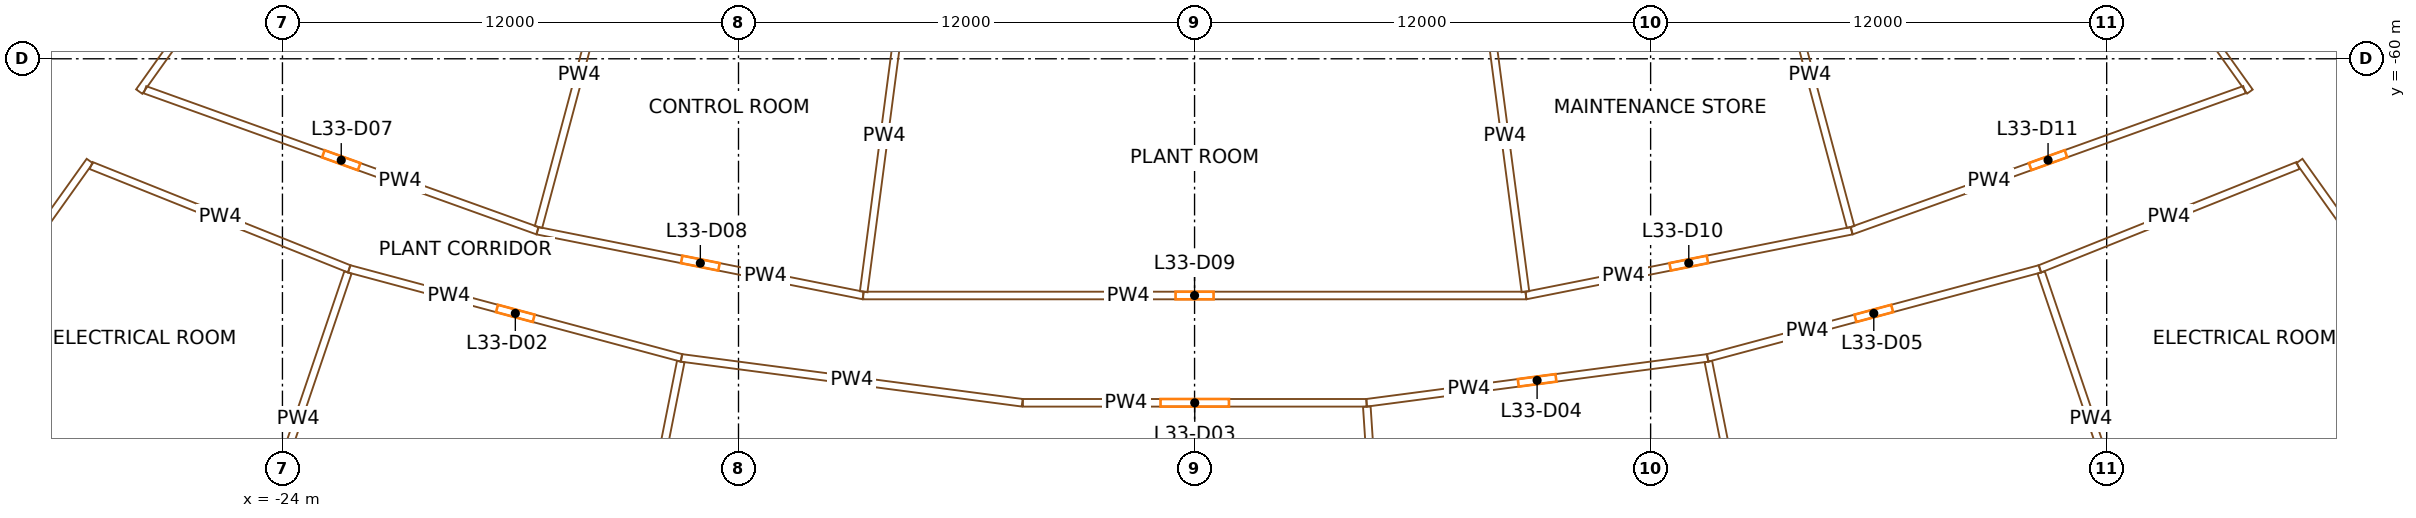
"""IFC4 building model, lengths in metres.
Left out: names, types, materials, properties, quantities, classifications, styles, units other than length and angle.
Written with IfcOpenShell. Run it as: python <this file> out.ifc"""

import sys

from ifc_helpers import new_model, si_unit, direction, frame, frame_2d, origin, place, context, subcontext, project, spatial, rectangle, extrude, element, fill, save


model = new_model("IFC4")
c1 = context("Model", 3, precision=1e-05, world=origin(), true_north=direction((0.0, 1.0)))
c2 = subcontext(c1, "Body", "Model", "MODEL_VIEW")
j1 = project(units=[si_unit("LENGTHUNIT", "METRE"), si_unit("PLANEANGLEUNIT", "RADIAN")], contexts=[c1])
p1 = place(None, origin())
s1 = spatial("IfcSite", under=j1, at=p1, CompositionType="ELEMENT")
p2 = place(p1, origin())
s2 = spatial("IfcBuilding", under=s1, at=p2, CompositionType="ELEMENT")
p3 = place(p2, frame((0.0, 0.0, 144.3)))
s3 = spatial("IfcBuildingStorey", under=s2, at=p3, CompositionType="ELEMENT", Elevation=144.3)
p4 = place(p3, frame((-36.717, -66.337, 0.0), z_axis=(0.0, 0.0, 1.0), x_axis=(0.573577477574, 0.819151315216, 0.0)))
e1 = element("IfcWall", 1, at=p4, inside=s3, PredefinedType="SHEAR", context=c2, shape_type="SweptSolid", body=[
    extrude(rectangle(XDim=14.8, YDim=0.9, at=frame_2d((7.4, 0.0))), origin(), (0.0, 0.0, 1.0), 4.7),
])
p5 = place(p4, frame((6.2, 0.0, 0.0)))
e2 = element("IfcOpeningElement", 2, at=p5, cuts=e1, PredefinedType="OPENING", context=c2, shape_type="SweptSolid", body=[
    extrude(rectangle(XDim=2.4, YDim=2.1, at=frame_2d((1.2, 1.05))), frame((0.0, 0.46, 0.0), z_axis=(0.0, -1.0, 0.0), x_axis=(1.0, 0.0, 0.0)), (0.0, 0.0, 1.0), 0.92),
])
p6 = place(p3, frame((36.717, -66.337, 0.0), z_axis=(0.0, 0.0, 1.0), x_axis=(-0.573577477574, 0.819151315216, 0.0)))
e3 = element("IfcWall", 3, at=p6, inside=s3, PredefinedType="SHEAR", context=c2, shape_type="SweptSolid", body=[
    extrude(rectangle(XDim=14.8, YDim=0.9, at=frame_2d((7.4, 0.0))), origin(), (0.0, 0.0, 1.0), 4.7),
])
p7 = place(p6, frame((6.2, 0.0, 0.0)))
e4 = element("IfcOpeningElement", 4, at=p7, cuts=e3, PredefinedType="OPENING", context=c2, shape_type="SweptSolid", body=[
    extrude(rectangle(XDim=2.4, YDim=2.1, at=frame_2d((1.2, 1.05))), frame((0.0, 0.46, 0.0), z_axis=(0.0, -1.0, 0.0), x_axis=(1.0, 0.0, 0.0)), (0.0, 0.0, 1.0), 0.92),
])
p8 = place(p3, frame((-34.153, -69.829, 0.0), z_axis=(0.0, 0.0, 1.0), x_axis=(0.923879094783, -0.382684489133, 0.0)))
e5 = element("IfcWall", 5, at=p8, inside=s3, PredefinedType="PARTITIONING", context=c2, shape_type="SweptSolid", body=[
    extrude(rectangle(XDim=9.916, YDim=0.6, at=frame_2d((4.958, 0.0))), origin(), (0.0, 0.0, 1.0), 3.6),
])
p9 = place(p3, frame((-29.07, -62.69, 0.0), z_axis=(0.0, 0.0, 1.0), x_axis=(-0.580017920191, -0.814603714856, 0.0)))
e6 = element("IfcWall", 6, at=p9, inside=s3, PredefinedType="PARTITIONING", context=c2, shape_type="SweptSolid", body=[
    extrude(rectangle(XDim=8.464, YDim=0.2, at=frame_2d((4.232, 0.0))), origin(), (0.0, 0.0, 1.0), 3.6),
])
p10 = place(p9, frame((3.732, 0.0, 0.0)))
e7 = element("IfcOpeningElement", 7, at=p10, cuts=e6, PredefinedType="OPENING", context=c2, shape_type="SweptSolid", body=[
    extrude(rectangle(XDim=1.0, YDim=2.1, at=frame_2d((0.5, 1.05))), frame((0.0, 0.11, 0.0), z_axis=(0.0, -1.0, 0.0), x_axis=(1.0, 0.0, 0.0)), (0.0, 0.0, 1.0), 0.22),
])
p11 = place(p3, frame((-29.035, -62.808, 0.0), z_axis=(0.0, 0.0, 1.0), x_axis=(0.928343133184, -0.371724396657, 0.0)))
e8 = element("IfcWall", 8, at=p11, inside=s3, PredefinedType="PARTITIONING", context=c2, shape_type="SweptSolid", body=[
    extrude(rectangle(XDim=7.315, YDim=0.2, at=frame_2d((3.658, 0.0))), origin(), (0.0, 0.0, 1.0), 3.6),
])
p12 = place(p3, frame((-27.616, -60.815, 0.0), z_axis=(0.0, 0.0, 1.0), x_axis=(0.941144953961, -0.338003218377, 0.0)))
e9 = element("IfcWall", 9, at=p12, inside=s3, PredefinedType="PARTITIONING", context=c2, shape_type="SweptSolid", body=[
    extrude(rectangle(XDim=10.973, YDim=0.2, at=frame_2d((5.487, 0.0))), origin(), (0.0, 0.0, 1.0), 3.6),
])
p13 = place(p12, frame((4.987, 0.0, 0.0)))
e10 = element("IfcOpeningElement", 10, at=p13, cuts=e9, PredefinedType="OPENING", context=c2, shape_type="SweptSolid", body=[
    extrude(rectangle(XDim=1.0, YDim=2.1, at=frame_2d((0.5, 1.05))), frame((0.0, 0.11, 0.0), z_axis=(0.0, -1.0, 0.0), x_axis=(1.0, 0.0, 0.0)), (0.0, 0.0, 1.0), 0.22),
])
p14 = place(p3, frame((-24.896, -73.34, 0.0), z_axis=(0.0, 0.0, 1.0), x_axis=(0.321453202328, 0.946925466292, 0.0)))
e11 = element("IfcWall", 11, at=p14, inside=s3, PredefinedType="PARTITIONING", context=c2, shape_type="SweptSolid", body=[
    extrude(rectangle(XDim=8.15, YDim=0.2, at=frame_2d((4.075, 0.0))), origin(), (0.0, 0.0, 1.0), 3.6),
])
p15 = place(p3, frame((-22.746, -53.809, 0.0), z_axis=(0.0, 0.0, 1.0), x_axis=(-0.580002652606, -0.814614585537, 0.0)))
e12 = element("IfcWall", 12, at=p15, inside=s3, PredefinedType="PARTITIONING", context=c2, shape_type="SweptSolid", body=[
    extrude(rectangle(XDim=8.659, YDim=0.2, at=frame_2d((4.33, 0.0))), origin(), (0.0, 0.0, 1.0), 3.6),
])
p16 = place(p3, frame((-13.5, -67.87, 0.0), z_axis=(0.0, 0.0, 1.0), x_axis=(-0.965926260719, 0.258817423781, 0.0)))
e13 = element("IfcWall", 13, at=p16, inside=s3, PredefinedType="PARTITIONING", context=c2, shape_type="SweptSolid", body=[
    extrude(rectangle(XDim=9.052, YDim=0.2, at=frame_2d((4.526, 0.0))), origin(), (0.0, 0.0, 1.0), 3.6),
])
p17 = place(p16, frame((4.026, 0.0, 0.0)))
e14 = element("IfcOpeningElement", 14, at=p17, cuts=e13, PredefinedType="OPENING", context=c2, shape_type="SweptSolid", body=[
    extrude(rectangle(XDim=1.0, YDim=2.1, at=frame_2d((0.5, 1.05))), frame((0.0, 0.11, 0.0), z_axis=(0.0, -1.0, 0.0), x_axis=(1.0, 0.0, 0.0)), (0.0, 0.0, 1.0), 0.22),
])
p18 = place(p3, frame((-17.289, -64.524, 0.0), z_axis=(0.0, 0.0, 1.0), x_axis=(0.980786466832, -0.195084357342, 0.0)))
e15 = element("IfcWall", 15, at=p18, inside=s3, PredefinedType="PARTITIONING", context=c2, shape_type="SweptSolid", body=[
    extrude(rectangle(XDim=8.738, YDim=0.2, at=frame_2d((4.369, 0.0))), origin(), (0.0, 0.0, 1.0), 3.6),
])
p19 = place(p18, frame((3.869, 0.0, 0.0)))
e16 = element("IfcOpeningElement", 16, at=p19, cuts=e15, PredefinedType="OPENING", context=c2, shape_type="SweptSolid", body=[
    extrude(rectangle(XDim=1.0, YDim=2.1, at=frame_2d((0.5, 1.05))), frame((0.0, 0.11, 0.0), z_axis=(0.0, -1.0, 0.0), x_axis=(1.0, 0.0, 0.0)), (0.0, 0.0, 1.0), 0.22),
])
p20 = place(p3, frame((-15.11, -75.962, 0.0), z_axis=(0.0, 0.0, 1.0), x_axis=(0.195102141606, 0.980782929267, 0.0)))
e17 = element("IfcWall", 17, at=p20, inside=s3, PredefinedType="PARTITIONING", context=c2, shape_type="SweptSolid", body=[
    extrude(rectangle(XDim=8.15, YDim=0.2, at=frame_2d((4.075, 0.0))), origin(), (0.0, 0.0, 1.0), 3.6),
])
p21 = place(p3, frame((-15.122, -56.435, 0.0), z_axis=(0.0, 0.0, 1.0), x_axis=(-0.258815723485, -0.965926716308, 0.0)))
e18 = element("IfcWall", 18, at=p21, inside=s3, PredefinedType="PARTITIONING", context=c2, shape_type="SweptSolid", body=[
    extrude(rectangle(XDim=8.275, YDim=0.2, at=frame_2d((4.137, 0.0))), origin(), (0.0, 0.0, 1.0), 3.6),
])
p22 = place(p3, frame((-13.5, -67.87, 0.0), z_axis=(0.0, 0.0, 1.0), x_axis=(0.991445838679, -0.130518768632, 0.0)))
e19 = element("IfcWall", 19, at=p22, inside=s3, PredefinedType="PARTITIONING", context=c2, shape_type="SweptSolid", body=[
    extrude(rectangle(XDim=9.042, YDim=0.2, at=frame_2d((4.521, 0.0))), origin(), (0.0, 0.0, 1.0), 3.6),
])
p23 = place(p3, frame((-8.719, -66.229, 0.0), z_axis=(0.0, 0.0, 1.0), x_axis=(1.0, 0.0, 0.0)))
e20 = element("IfcWall", 20, at=p23, inside=s3, PredefinedType="PARTITIONING", context=c2, shape_type="SweptSolid", body=[
    extrude(rectangle(XDim=17.438, YDim=0.2, at=frame_2d((8.719, 0.0))), origin(), (0.0, 0.0, 1.0), 3.6),
])
p24 = place(p23, frame((8.219, 0.0, 0.0)))
e21 = element("IfcOpeningElement", 21, at=p24, cuts=e20, PredefinedType="OPENING", context=c2, shape_type="SweptSolid", body=[
    extrude(rectangle(XDim=1.0, YDim=2.1, at=frame_2d((0.5, 1.05))), frame((0.0, 0.11, 0.0), z_axis=(0.0, -1.0, 0.0), x_axis=(1.0, 0.0, 0.0)), (0.0, 0.0, 1.0), 0.22),
])
p25 = place(p3, frame((-7.626, -57.926, 0.0), z_axis=(0.0, 0.0, 1.0), x_axis=(-0.130528544963, -0.991444551626, 0.0)))
e22 = element("IfcWall", 22, at=p25, inside=s3, PredefinedType="PARTITIONING", context=c2, shape_type="SweptSolid", body=[
    extrude(rectangle(XDim=8.275, YDim=0.2, at=frame_2d((4.137, 0.0))), origin(), (0.0, 0.0, 1.0), 3.6),
])
p26 = place(p3, frame((4.526, -69.052, 0.0), z_axis=(0.0, 0.0, 1.0), x_axis=(-1.0, 0.0, 0.0)))
e23 = element("IfcWall", 23, at=p26, inside=s3, PredefinedType="PARTITIONING", context=c2, shape_type="SweptSolid", body=[
    extrude(rectangle(XDim=9.042, YDim=0.2, at=frame_2d((4.521, 0.0))), origin(), (0.0, 0.0, 1.0), 3.6),
])
p27 = place(p26, frame((3.621, 0.0, 0.0)))
e24 = element("IfcOpeningElement", 24, at=p27, cuts=e23, PredefinedType="OPENING", context=c2, shape_type="SweptSolid", body=[
    extrude(rectangle(XDim=1.8, YDim=2.4, at=frame_2d((0.9, 1.2))), frame((0.0, 0.11, 0.0), z_axis=(0.0, -1.0, 0.0), x_axis=(1.0, 0.0, 0.0)), (0.0, 0.0, 1.0), 0.22),
])
p28 = place(p3, frame((13.5, -67.87, 0.0), z_axis=(0.0, 0.0, 1.0), x_axis=(-0.991446306881, -0.13051521203, 0.0)))
e25 = element("IfcWall", 25, at=p28, inside=s3, PredefinedType="PARTITIONING", context=c2, shape_type="SweptSolid", body=[
    extrude(rectangle(XDim=9.052, YDim=0.2, at=frame_2d((4.526, 0.0))), origin(), (0.0, 0.0, 1.0), 3.6),
])
p29 = place(p28, frame((4.026, 0.0, 0.0)))
e26 = element("IfcOpeningElement", 26, at=p29, cuts=e25, PredefinedType="OPENING", context=c2, shape_type="SweptSolid", body=[
    extrude(rectangle(XDim=1.0, YDim=2.1, at=frame_2d((0.5, 1.05))), frame((0.0, 0.11, 0.0), z_axis=(0.0, -1.0, 0.0), x_axis=(1.0, 0.0, 0.0)), (0.0, 0.0, 1.0), 0.22),
])
p30 = place(p3, frame((5.065, -77.284, 0.0), z_axis=(0.0, 0.0, 1.0), x_axis=(-0.065393635367, 0.997859545454, 0.0)))
e27 = element("IfcWall", 27, at=p30, inside=s3, PredefinedType="PARTITIONING", context=c2, shape_type="SweptSolid", body=[
    extrude(rectangle(XDim=8.15, YDim=0.2, at=frame_2d((4.075, 0.0))), origin(), (0.0, 0.0, 1.0), 3.6),
])
p31 = place(p3, frame((7.626, -57.926, 0.0), z_axis=(0.0, 0.0, 1.0), x_axis=(0.130528544963, -0.991444551626, 0.0)))
e28 = element("IfcWall", 28, at=p31, inside=s3, PredefinedType="PARTITIONING", context=c2, shape_type="SweptSolid", body=[
    extrude(rectangle(XDim=8.275, YDim=0.2, at=frame_2d((4.137, 0.0))), origin(), (0.0, 0.0, 1.0), 3.6),
])
p32 = place(p3, frame((8.719, -66.229, 0.0), z_axis=(0.0, 0.0, 1.0), x_axis=(0.980786466832, 0.195084357342, 0.0)))
e29 = element("IfcWall", 29, at=p32, inside=s3, PredefinedType="PARTITIONING", context=c2, shape_type="SweptSolid", body=[
    extrude(rectangle(XDim=8.738, YDim=0.2, at=frame_2d((4.369, 0.0))), origin(), (0.0, 0.0, 1.0), 3.6),
])
p33 = place(p32, frame((3.869, 0.0, 0.0)))
e30 = element("IfcOpeningElement", 30, at=p33, cuts=e29, PredefinedType="OPENING", context=c2, shape_type="SweptSolid", body=[
    extrude(rectangle(XDim=1.0, YDim=2.1, at=frame_2d((0.5, 1.05))), frame((0.0, 0.11, 0.0), z_axis=(0.0, -1.0, 0.0), x_axis=(1.0, 0.0, 0.0)), (0.0, 0.0, 1.0), 0.22),
])
p34 = place(p3, frame((22.244, -65.528, 0.0), z_axis=(0.0, 0.0, 1.0), x_axis=(-0.965926260719, -0.258817423781, 0.0)))
e31 = element("IfcWall", 31, at=p34, inside=s3, PredefinedType="PARTITIONING", context=c2, shape_type="SweptSolid", body=[
    extrude(rectangle(XDim=9.052, YDim=0.2, at=frame_2d((4.526, 0.0))), origin(), (0.0, 0.0, 1.0), 3.6),
])
p35 = place(p34, frame((4.026, 0.0, 0.0)))
e32 = element("IfcOpeningElement", 32, at=p35, cuts=e31, PredefinedType="OPENING", context=c2, shape_type="SweptSolid", body=[
    extrude(rectangle(XDim=1.0, YDim=2.1, at=frame_2d((0.5, 1.05))), frame((0.0, 0.11, 0.0), z_axis=(0.0, -1.0, 0.0), x_axis=(1.0, 0.0, 0.0)), (0.0, 0.0, 1.0), 0.22),
])
p36 = place(p3, frame((15.122, -56.435, 0.0), z_axis=(0.0, 0.0, 1.0), x_axis=(0.258815723485, -0.965926716308, 0.0)))
e33 = element("IfcWall", 33, at=p36, inside=s3, PredefinedType="PARTITIONING", context=c2, shape_type="SweptSolid", body=[
    extrude(rectangle(XDim=8.275, YDim=0.2, at=frame_2d((4.137, 0.0))), origin(), (0.0, 0.0, 1.0), 3.6),
])
p37 = place(p3, frame((15.11, -75.962, 0.0), z_axis=(0.0, 0.0, 1.0), x_axis=(-0.195102141606, 0.980782929267, 0.0)))
e34 = element("IfcWall", 34, at=p37, inside=s3, PredefinedType="PARTITIONING", context=c2, shape_type="SweptSolid", body=[
    extrude(rectangle(XDim=8.15, YDim=0.2, at=frame_2d((4.075, 0.0))), origin(), (0.0, 0.0, 1.0), 3.6),
])
p38 = place(p3, frame((17.289, -64.524, 0.0), z_axis=(0.0, 0.0, 1.0), x_axis=(0.941152070644, 0.337983401845, 0.0)))
e35 = element("IfcWall", 35, at=p38, inside=s3, PredefinedType="PARTITIONING", context=c2, shape_type="SweptSolid", body=[
    extrude(rectangle(XDim=10.983, YDim=0.2, at=frame_2d((5.492, 0.0))), origin(), (0.0, 0.0, 1.0), 3.6),
])
p39 = place(p38, frame((4.992, 0.0, 0.0)))
e36 = element("IfcOpeningElement", 36, at=p39, cuts=e35, PredefinedType="OPENING", context=c2, shape_type="SweptSolid", body=[
    extrude(rectangle(XDim=1.0, YDim=2.1, at=frame_2d((0.5, 1.05))), frame((0.0, 0.11, 0.0), z_axis=(0.0, -1.0, 0.0), x_axis=(1.0, 0.0, 0.0)), (0.0, 0.0, 1.0), 0.22),
])
p40 = place(p3, frame((22.244, -65.528, 0.0), z_axis=(0.0, 0.0, 1.0), x_axis=(0.928343133184, 0.371724396657, 0.0)))
e37 = element("IfcWall", 37, at=p40, inside=s3, PredefinedType="PARTITIONING", context=c2, shape_type="SweptSolid", body=[
    extrude(rectangle(XDim=7.315, YDim=0.2, at=frame_2d((3.658, 0.0))), origin(), (0.0, 0.0, 1.0), 3.6),
])
p41 = place(p3, frame((22.746, -53.809, 0.0), z_axis=(0.0, 0.0, 1.0), x_axis=(0.580002652606, -0.814614585537, 0.0)))
e38 = element("IfcWall", 38, at=p41, inside=s3, PredefinedType="PARTITIONING", context=c2, shape_type="SweptSolid", body=[
    extrude(rectangle(XDim=8.659, YDim=0.18, at=frame_2d((4.33, 0.0))), origin(), (0.0, 0.0, 1.0), 3.6),
])
p42 = place(p3, frame((24.896, -73.34, 0.0), z_axis=(0.0, 0.0, 1.0), x_axis=(-0.321453202328, 0.946925466292, 0.0)))
e39 = element("IfcWall", 39, at=p42, inside=s3, PredefinedType="PARTITIONING", context=c2, shape_type="SweptSolid", body=[
    extrude(rectangle(XDim=8.15, YDim=0.2, at=frame_2d((4.075, 0.0))), origin(), (0.0, 0.0, 1.0), 3.6),
])
p43 = place(p3, frame((24.992, -73.624, 0.0), z_axis=(0.0, 0.0, 1.0), x_axis=(0.923879094783, 0.382684489133, 0.0)))
e40 = element("IfcWall", 40, at=p43, inside=s3, PredefinedType="PARTITIONING", context=c2, shape_type="SweptSolid", body=[
    extrude(rectangle(XDim=9.916, YDim=0.6, at=frame_2d((4.958, 0.0))), origin(), (0.0, 0.0, 1.0), 3.6),
])
p44 = place(p3, frame((33.979, -69.585, 0.0), z_axis=(0.0, 0.0, 1.0), x_axis=(-0.580017920191, 0.814603714856, 0.0)))
e41 = element("IfcWall", 41, at=p44, inside=s3, PredefinedType="PARTITIONING", context=c2, shape_type="SweptSolid", body=[
    extrude(rectangle(XDim=8.464, YDim=0.2, at=frame_2d((4.232, 0.0))), origin(), (0.0, 0.0, 1.0), 3.6),
])
p45 = place(p44, frame((3.732, 0.0, 0.0)))
e42 = element("IfcOpeningElement", 42, at=p45, cuts=e41, PredefinedType="OPENING", context=c2, shape_type="SweptSolid", body=[
    extrude(rectangle(XDim=1.0, YDim=2.1, at=frame_2d((0.5, 1.05))), frame((0.0, 0.11, 0.0), z_axis=(0.0, -1.0, 0.0), x_axis=(1.0, 0.0, 0.0)), (0.0, 0.0, 1.0), 0.22),
])
p46 = place(p17, origin())
e43 = element("IfcDoor", 43, at=p46, inside=s3, OperationType="SINGLE_SWING_RIGHT", PredefinedType="DOOR", context=c2, shape_type="SweptSolid", body=[
    extrude(rectangle(XDim=1.0, YDim=2.1, at=frame_2d((0.5, 1.05))), frame((0.0, 0.025, 0.0), z_axis=(0.0, -1.0, 0.0), x_axis=(1.0, 0.0, 0.0)), (0.0, 0.0, 1.0), 0.05),
])
fill(e14, e43)
p47 = place(p27, origin())
e44 = element("IfcDoor", 44, at=p47, inside=s3, OperationType="DOUBLE_DOOR_SINGLE_SWING", PredefinedType="DOOR", context=c2, shape_type="SweptSolid", body=[
    extrude(rectangle(XDim=1.8, YDim=2.4, at=frame_2d((0.9, 1.2))), frame((0.0, 0.025, 0.0), z_axis=(0.0, -1.0, 0.0), x_axis=(1.0, 0.0, 0.0)), (0.0, 0.0, 1.0), 0.05),
])
fill(e24, e44)
p48 = place(p29, origin())
e45 = element("IfcDoor", 45, at=p48, inside=s3, OperationType="SINGLE_SWING_RIGHT", PredefinedType="DOOR", context=c2, shape_type="SweptSolid", body=[
    extrude(rectangle(XDim=1.0, YDim=2.1, at=frame_2d((0.5, 1.05))), frame((0.0, 0.025, 0.0), z_axis=(0.0, -1.0, 0.0), x_axis=(1.0, 0.0, 0.0)), (0.0, 0.0, 1.0), 0.05),
])
fill(e26, e45)
p49 = place(p35, origin())
e46 = element("IfcDoor", 46, at=p49, inside=s3, OperationType="SINGLE_SWING_RIGHT", PredefinedType="DOOR", context=c2, shape_type="SweptSolid", body=[
    extrude(rectangle(XDim=1.0, YDim=2.1, at=frame_2d((0.5, 1.05))), frame((0.0, 0.025, 0.0), z_axis=(0.0, -1.0, 0.0), x_axis=(1.0, 0.0, 0.0)), (0.0, 0.0, 1.0), 0.05),
])
fill(e32, e46)
p50 = place(p13, origin())
e47 = element("IfcDoor", 47, at=p50, inside=s3, OperationType="SINGLE_SWING_RIGHT", PredefinedType="DOOR", context=c2, shape_type="SweptSolid", body=[
    extrude(rectangle(XDim=1.0, YDim=2.1, at=frame_2d((0.5, 1.05))), frame((0.0, 0.025, 0.0), z_axis=(0.0, -1.0, 0.0), x_axis=(1.0, 0.0, 0.0)), (0.0, 0.0, 1.0), 0.05),
])
fill(e10, e47)
p51 = place(p19, origin())
e48 = element("IfcDoor", 48, at=p51, inside=s3, OperationType="SINGLE_SWING_RIGHT", PredefinedType="DOOR", context=c2, shape_type="SweptSolid", body=[
    extrude(rectangle(XDim=1.0, YDim=2.1, at=frame_2d((0.5, 1.05))), frame((0.0, 0.025, 0.0), z_axis=(0.0, -1.0, 0.0), x_axis=(1.0, 0.0, 0.0)), (0.0, 0.0, 1.0), 0.05),
])
fill(e16, e48)
p52 = place(p24, origin())
e49 = element("IfcDoor", 49, at=p52, inside=s3, OperationType="SINGLE_SWING_RIGHT", PredefinedType="DOOR", context=c2, shape_type="SweptSolid", body=[
    extrude(rectangle(XDim=1.0, YDim=2.1, at=frame_2d((0.5, 1.05))), frame((0.0, 0.025, 0.0), z_axis=(0.0, -1.0, 0.0), x_axis=(1.0, 0.0, 0.0)), (0.0, 0.0, 1.0), 0.05),
])
fill(e21, e49)
p53 = place(p33, origin())
e50 = element("IfcDoor", 50, at=p53, inside=s3, OperationType="SINGLE_SWING_RIGHT", PredefinedType="DOOR", context=c2, shape_type="SweptSolid", body=[
    extrude(rectangle(XDim=1.0, YDim=2.1, at=frame_2d((0.5, 1.05))), frame((0.0, 0.025, 0.0), z_axis=(0.0, -1.0, 0.0), x_axis=(1.0, 0.0, 0.0)), (0.0, 0.0, 1.0), 0.05),
])
fill(e30, e50)
p54 = place(p39, origin())
e51 = element("IfcDoor", 51, at=p54, inside=s3, OperationType="SINGLE_SWING_RIGHT", PredefinedType="DOOR", context=c2, shape_type="SweptSolid", body=[
    extrude(rectangle(XDim=1.0, YDim=2.1, at=frame_2d((0.5, 1.05))), frame((0.0, 0.025, 0.0), z_axis=(0.0, -1.0, 0.0), x_axis=(1.0, 0.0, 0.0)), (0.0, 0.0, 1.0), 0.05),
])
fill(e36, e51)
save(model, sys.argv[1])
